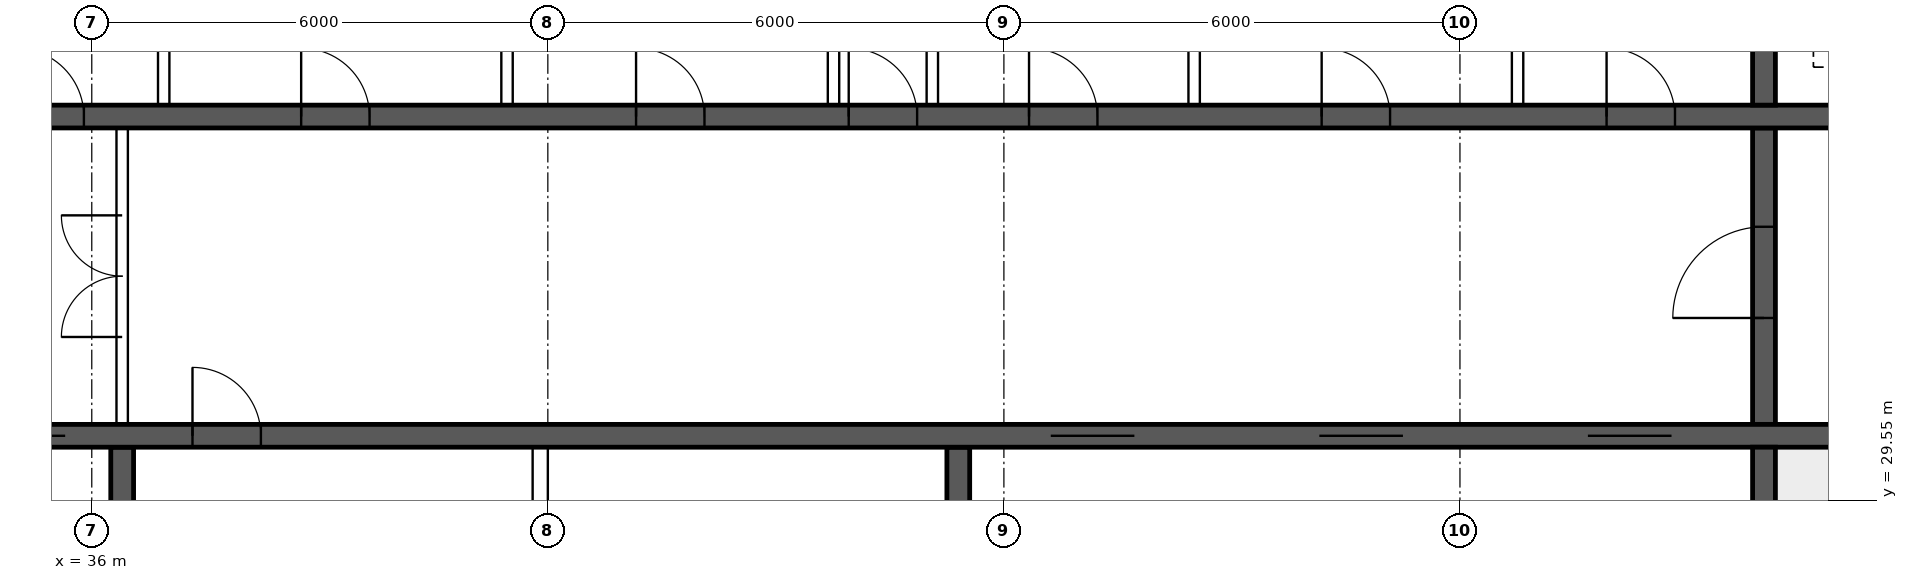
"""IFC4 building model, lengths in metres.
Left out: names, types, materials, properties, quantities, classifications, styles, units other than length and angle.
Written with IfcOpenShell. Run it as: python <this file> out.ifc"""

import sys

from ifc_helpers import new_model, si_unit, direction, frame, frame_2d, origin, place, context, subcontext, project, spatial, rectangle, extrude, element, fill, save


model = new_model("IFC4")
c1 = context("Model", 3, precision=1e-05, world=origin(), true_north=direction((0.0, 1.0)))
c2 = subcontext(c1, "Body", "Model", "MODEL_VIEW")
j1 = project(units=[si_unit("LENGTHUNIT", "METRE"), si_unit("PLANEANGLEUNIT", "RADIAN")], contexts=[c1])
p1 = place(None, origin())
s1 = spatial("IfcSite", under=j1, at=p1, CompositionType="ELEMENT")
p2 = place(p1, origin())
s2 = spatial("IfcBuilding", under=s1, at=p2, CompositionType="ELEMENT")
p3 = place(p2, frame((0.0, 0.0, 212.8)))
s3 = spatial("IfcBuildingStorey", under=s2, at=p3, CompositionType="ELEMENT", Elevation=212.8)
p4 = place(p3, frame((18.35, 30.4, 0.0), z_axis=(0.0, 0.0, 1.0), x_axis=(1.0, 0.0, 0.0)))
e1 = element("IfcWall", 1, at=p4, inside=s3, PredefinedType="SHEAR", context=c2, shape_type="SweptSolid", body=[
    extrude(rectangle(XDim=47.3, YDim=0.3, at=frame_2d((23.65, 0.0))), origin(), (0.0, 0.0, 1.0), 3.75),
])
p5 = place(p4, frame((0.4, 0.0, 0.0)))
e2 = element("IfcOpeningElement", 2, at=p5, cuts=e1, PredefinedType="OPENING", context=c2, shape_type="SweptSolid", body=[
    extrude(rectangle(XDim=1.0, YDim=2.1, at=frame_2d((0.5, 1.05))), frame((0.0, 0.16, 0.0), z_axis=(0.0, -1.0, 0.0), x_axis=(1.0, 0.0, 0.0)), (0.0, 0.0, 1.0), 0.32),
])
p6 = place(p4, frame((45.9, 0.0, 0.0)))
e3 = element("IfcOpeningElement", 3, at=p6, cuts=e1, PredefinedType="OPENING", context=c2, shape_type="SweptSolid", body=[
    extrude(rectangle(XDim=1.0, YDim=2.1, at=frame_2d((0.5, 1.05))), frame((0.0, 0.16, 0.0), z_axis=(0.0, -1.0, 0.0), x_axis=(1.0, 0.0, 0.0)), (0.0, 0.0, 1.0), 0.32),
])
p7 = place(p4, frame((8.4, 0.0, 0.0)))
e4 = element("IfcOpeningElement", 4, at=p7, cuts=e1, PredefinedType="OPENING", context=c2, shape_type="SweptSolid", body=[
    extrude(rectangle(XDim=1.1, YDim=2.1, at=frame_2d((0.55, 1.05))), frame((0.0, 0.16, 0.0), z_axis=(0.0, -1.0, 0.0), x_axis=(1.0, 0.0, 0.0)), (0.0, 0.0, 1.0), 0.32),
])
p8 = place(p4, frame((11.0, 0.0, 0.0)))
e5 = element("IfcOpeningElement", 5, at=p8, cuts=e1, PredefinedType="OPENING", context=c2, shape_type="SweptSolid", body=[
    extrude(rectangle(XDim=1.1, YDim=2.1, at=frame_2d((0.55, 1.05))), frame((0.0, 0.16, 0.0), z_axis=(0.0, -1.0, 0.0), x_axis=(1.0, 0.0, 0.0)), (0.0, 0.0, 1.0), 0.32),
])
p9 = place(p4, frame((13.6, 0.0, 0.0)))
e6 = element("IfcOpeningElement", 6, at=p9, cuts=e1, PredefinedType="OPENING", context=c2, shape_type="SweptSolid", body=[
    extrude(rectangle(XDim=1.1, YDim=2.1, at=frame_2d((0.55, 1.05))), frame((0.0, 0.16, 0.0), z_axis=(0.0, -1.0, 0.0), x_axis=(1.0, 0.0, 0.0)), (0.0, 0.0, 1.0), 0.32),
])
p10 = place(p4, frame((16.2, 0.0, 0.0)))
e7 = element("IfcOpeningElement", 7, at=p10, cuts=e1, PredefinedType="OPENING", context=c2, shape_type="SweptSolid", body=[
    extrude(rectangle(XDim=1.1, YDim=2.1, at=frame_2d((0.55, 1.05))), frame((0.0, 0.16, 0.0), z_axis=(0.0, -1.0, 0.0), x_axis=(1.0, 0.0, 0.0)), (0.0, 0.0, 1.0), 0.32),
])
p11 = place(p4, frame((18.975, 0.0, 0.0)))
e8 = element("IfcOpeningElement", 8, at=p11, cuts=e1, PredefinedType="OPENING", context=c2, shape_type="SweptSolid", body=[
    extrude(rectangle(XDim=0.9, YDim=2.1, at=frame_2d((0.45, 1.05))), frame((0.0, 0.16, 0.0), z_axis=(0.0, -1.0, 0.0), x_axis=(1.0, 0.0, 0.0)), (0.0, 0.0, 1.0), 0.32),
])
p12 = place(p4, frame((30.267, 0.0, 0.0)))
e9 = element("IfcOpeningElement", 9, at=p12, cuts=e1, PredefinedType="OPENING", context=c2, shape_type="SweptSolid", body=[
    extrude(rectangle(XDim=1.1, YDim=2.1, at=frame_2d((0.55, 1.05))), frame((0.0, 0.16, 0.0), z_axis=(0.0, -1.0, 0.0), x_axis=(1.0, 0.0, 0.0)), (0.0, 0.0, 1.0), 0.32),
])
p13 = place(p4, frame((33.8, 0.0, 0.0)))
e10 = element("IfcOpeningElement", 10, at=p13, cuts=e1, PredefinedType="OPENING", context=c2, shape_type="SweptSolid", body=[
    extrude(rectangle(XDim=1.1, YDim=2.1, at=frame_2d((0.55, 1.05))), frame((0.0, 0.16, 0.0), z_axis=(0.0, -1.0, 0.0), x_axis=(1.0, 0.0, 0.0)), (0.0, 0.0, 1.0), 0.32),
])
p14 = place(p4, frame((37.333, 0.0, 0.0)))
e11 = element("IfcOpeningElement", 11, at=p14, cuts=e1, PredefinedType="OPENING", context=c2, shape_type="SweptSolid", body=[
    extrude(rectangle(XDim=1.1, YDim=2.1, at=frame_2d((0.55, 1.05))), frame((0.0, 0.16, 0.0), z_axis=(0.0, -1.0, 0.0), x_axis=(1.0, 0.0, 0.0)), (0.0, 0.0, 1.0), 0.32),
])
p15 = place(p3, frame((18.35, 34.6, 0.0), z_axis=(0.0, 0.0, 1.0), x_axis=(1.0, 0.0, 0.0)))
e12 = element("IfcWall", 12, at=p15, inside=s3, PredefinedType="SHEAR", context=c2, shape_type="SweptSolid", body=[
    extrude(rectangle(XDim=47.3, YDim=0.3, at=frame_2d((23.65, 0.0))), origin(), (0.0, 0.0, 1.0), 3.75),
])
p16 = place(p15, frame((0.9, 0.0, 0.0)))
e13 = element("IfcOpeningElement", 13, at=p16, cuts=e12, PredefinedType="OPENING", context=c2, shape_type="SweptSolid", body=[
    extrude(rectangle(XDim=1.1, YDim=2.1, at=frame_2d((0.55, 1.05))), frame((0.0, 0.16, 0.0), z_axis=(0.0, -1.0, 0.0), x_axis=(1.0, 0.0, 0.0)), (0.0, 0.0, 1.0), 0.32),
])
p17 = place(p15, frame((45.3, 0.0, 0.0)))
e14 = element("IfcOpeningElement", 14, at=p17, cuts=e12, PredefinedType="OPENING", context=c2, shape_type="SweptSolid", body=[
    extrude(rectangle(XDim=1.1, YDim=2.1, at=frame_2d((0.55, 1.05))), frame((0.0, 0.16, 0.0), z_axis=(0.0, -1.0, 0.0), x_axis=(1.0, 0.0, 0.0)), (0.0, 0.0, 1.0), 0.32),
])
p18 = place(p15, frame((4.25, 0.0, 0.0)))
e15 = element("IfcOpeningElement", 15, at=p18, cuts=e12, PredefinedType="OPENING", context=c2, shape_type="SweptSolid", body=[
    extrude(rectangle(XDim=0.9, YDim=2.1, at=frame_2d((0.45, 1.05))), frame((0.0, 0.16, 0.0), z_axis=(0.0, -1.0, 0.0), x_axis=(1.0, 0.0, 0.0)), (0.0, 0.0, 1.0), 0.32),
])
p19 = place(p15, frame((42.15, 0.0, 0.0)))
e16 = element("IfcOpeningElement", 16, at=p19, cuts=e12, PredefinedType="OPENING", context=c2, shape_type="SweptSolid", body=[
    extrude(rectangle(XDim=0.9, YDim=2.1, at=frame_2d((0.45, 1.05))), frame((0.0, 0.16, 0.0), z_axis=(0.0, -1.0, 0.0), x_axis=(1.0, 0.0, 0.0)), (0.0, 0.0, 1.0), 0.32),
])
p20 = place(p15, frame((9.025, 0.0, 0.0)))
e17 = element("IfcOpeningElement", 17, at=p20, cuts=e12, PredefinedType="OPENING", context=c2, shape_type="SweptSolid", body=[
    extrude(rectangle(XDim=0.9, YDim=2.1, at=frame_2d((0.45, 1.05))), frame((0.0, 0.16, 0.0), z_axis=(0.0, -1.0, 0.0), x_axis=(1.0, 0.0, 0.0)), (0.0, 0.0, 1.0), 0.32),
])
p21 = place(p15, frame((12.999, 0.0, 0.0)))
e18 = element("IfcOpeningElement", 18, at=p21, cuts=e12, PredefinedType="OPENING", context=c2, shape_type="SweptSolid", body=[
    extrude(rectangle(XDim=0.9, YDim=2.1, at=frame_2d((0.45, 1.05))), frame((0.0, 0.16, 0.0), z_axis=(0.0, -1.0, 0.0), x_axis=(1.0, 0.0, 0.0)), (0.0, 0.0, 1.0), 0.32),
])
p22 = place(p15, frame((16.646, 0.0, 0.0)))
e19 = element("IfcOpeningElement", 19, at=p22, cuts=e12, PredefinedType="OPENING", context=c2, shape_type="SweptSolid", body=[
    extrude(rectangle(XDim=0.9, YDim=2.1, at=frame_2d((0.45, 1.05))), frame((0.0, 0.16, 0.0), z_axis=(0.0, -1.0, 0.0), x_axis=(1.0, 0.0, 0.0)), (0.0, 0.0, 1.0), 0.32),
])
p23 = place(p15, frame((20.405, 0.0, 0.0)))
e20 = element("IfcOpeningElement", 20, at=p23, cuts=e12, PredefinedType="OPENING", context=c2, shape_type="SweptSolid", body=[
    extrude(rectangle(XDim=0.9, YDim=2.1, at=frame_2d((0.45, 1.05))), frame((0.0, 0.16, 0.0), z_axis=(0.0, -1.0, 0.0), x_axis=(1.0, 0.0, 0.0)), (0.0, 0.0, 1.0), 0.32),
])
p24 = place(p15, frame((24.811, 0.0, 0.0)))
e21 = element("IfcOpeningElement", 21, at=p24, cuts=e12, PredefinedType="OPENING", context=c2, shape_type="SweptSolid", body=[
    extrude(rectangle(XDim=0.9, YDim=2.1, at=frame_2d((0.45, 1.05))), frame((0.0, 0.16, 0.0), z_axis=(0.0, -1.0, 0.0), x_axis=(1.0, 0.0, 0.0)), (0.0, 0.0, 1.0), 0.32),
])
p25 = place(p15, frame((27.608, 0.0, 0.0)))
e22 = element("IfcOpeningElement", 22, at=p25, cuts=e12, PredefinedType="OPENING", context=c2, shape_type="SweptSolid", body=[
    extrude(rectangle(XDim=0.9, YDim=2.1, at=frame_2d((0.45, 1.05))), frame((0.0, 0.16, 0.0), z_axis=(0.0, -1.0, 0.0), x_axis=(1.0, 0.0, 0.0)), (0.0, 0.0, 1.0), 0.32),
])
p26 = place(p15, frame((29.981, 0.0, 0.0)))
e23 = element("IfcOpeningElement", 23, at=p26, cuts=e12, PredefinedType="OPENING", context=c2, shape_type="SweptSolid", body=[
    extrude(rectangle(XDim=0.9, YDim=2.1, at=frame_2d((0.45, 1.05))), frame((0.0, 0.16, 0.0), z_axis=(0.0, -1.0, 0.0), x_axis=(1.0, 0.0, 0.0)), (0.0, 0.0, 1.0), 0.32),
])
p27 = place(p15, frame((33.831, 0.0, 0.0)))
e24 = element("IfcOpeningElement", 24, at=p27, cuts=e12, PredefinedType="OPENING", context=c2, shape_type="SweptSolid", body=[
    extrude(rectangle(XDim=0.9, YDim=2.1, at=frame_2d((0.45, 1.05))), frame((0.0, 0.16, 0.0), z_axis=(0.0, -1.0, 0.0), x_axis=(1.0, 0.0, 0.0)), (0.0, 0.0, 1.0), 0.32),
])
p28 = place(p15, frame((37.579, 0.0, 0.0)))
e25 = element("IfcOpeningElement", 25, at=p28, cuts=e12, PredefinedType="OPENING", context=c2, shape_type="SweptSolid", body=[
    extrude(rectangle(XDim=0.9, YDim=2.1, at=frame_2d((0.45, 1.05))), frame((0.0, 0.16, 0.0), z_axis=(0.0, -1.0, 0.0), x_axis=(1.0, 0.0, 0.0)), (0.0, 0.0, 1.0), 0.32),
])
p29 = place(p3, frame((58.0, 26.15, 0.0), z_axis=(0.0, 0.0, 1.0), x_axis=(0.0, 1.0, 0.0)))
e26 = element("IfcWall", 26, at=p29, inside=s3, PredefinedType="SHEAR", context=c2, shape_type="SweptSolid", body=[
    extrude(rectangle(XDim=4.1, YDim=0.3, at=frame_2d((2.05, 0.0))), origin(), (0.0, 0.0, 1.0), 3.75),
])
p30 = place(p3, frame((58.0, 30.55, 0.0), z_axis=(0.0, 0.0, 1.0), x_axis=(0.0, 1.0, 0.0)))
e27 = element("IfcWall", 27, at=p30, inside=s3, PredefinedType="SHEAR", context=c2, shape_type="SweptSolid", body=[
    extrude(rectangle(XDim=3.9, YDim=0.3, at=frame_2d((1.95, 0.0))), origin(), (0.0, 0.0, 1.0), 3.75),
])
p31 = place(p30, frame((1.4, 0.0, 0.0)))
e28 = element("IfcOpeningElement", 28, at=p31, cuts=e27, PredefinedType="OPENING", context=c2, shape_type="SweptSolid", body=[
    extrude(rectangle(XDim=1.2, YDim=2.1, at=frame_2d((0.6, 1.05))), frame((0.0, 0.16, 0.0), z_axis=(0.0, -1.0, 0.0), x_axis=(1.0, 0.0, 0.0)), (0.0, 0.0, 1.0), 0.32),
])
p32 = place(p3, frame((58.0, 34.75, 0.0), z_axis=(0.0, 0.0, 1.0), x_axis=(0.0, 1.0, 0.0)))
e29 = element("IfcWall", 29, at=p32, inside=s3, PredefinedType="SHEAR", context=c2, shape_type="SweptSolid", body=[
    extrude(rectangle(XDim=3.1, YDim=0.3, at=frame_2d((1.55, 0.0))), origin(), (0.0, 0.0, 1.0), 3.75),
])
for number, where, z_axis, x_axis in (
    (30, (36.4, 26.15, 0.0), (0.0, 0.0, 1.0), (0.0, 1.0, 0.0)),
    (31, (47.4, 26.15, 0.0), (0.0, 0.0, 1.0), (0.0, 1.0, 0.0)),
):
    element("IfcWall", number, at=place(p3, frame(where, z_axis=z_axis, x_axis=x_axis)), inside=s3, PredefinedType="SHEAR", context=c2, shape_type="SweptSolid", body=[
        extrude(rectangle(XDim=4.1, YDim=0.3, at=frame_2d((2.05, 0.0))), origin(), (0.0, 0.0, 1.0), 3.75),
    ])
p33 = place(p3, frame((36.4, 30.55, 0.0), z_axis=(0.0, 0.0, 1.0), x_axis=(0.0, 1.0, 0.0)))
e32 = element("IfcWall", 32, at=p33, inside=s3, PredefinedType="SOLIDWALL", context=c2, shape_type="SweptSolid", body=[
    extrude(rectangle(XDim=3.9, YDim=0.15, at=frame_2d((1.95, 0.0))), origin(), (0.0, 0.0, 1.0), 3.3),
])
p34 = place(p33, frame((1.15, 0.0, 0.0)))
e33 = element("IfcOpeningElement", 33, at=p34, cuts=e32, PredefinedType="OPENING", context=c2, shape_type="SweptSolid", body=[
    extrude(rectangle(XDim=1.6, YDim=2.1, at=frame_2d((0.8, 1.05))), frame((0.0, 0.085, 0.0), z_axis=(0.0, -1.0, 0.0), x_axis=(1.0, 0.0, 0.0)), (0.0, 0.0, 1.0), 0.17),
])
for number, where, z_axis, x_axis in (
    (34, (36.946, 34.75, 0.0), (0.0, 0.0, 1.0), (0.0, 1.0, 0.0)),
    (35, (41.463, 34.75, 0.0), (0.0, 0.0, 1.0), (0.0, 1.0, 0.0)),
    (36, (45.758, 34.75, 0.0), (0.0, 0.0, 1.0), (0.0, 1.0, 0.0)),
    (37, (47.058, 34.75, 0.0), (0.0, 0.0, 1.0), (0.0, 1.0, 0.0)),
    (38, (50.503, 34.75, 0.0), (0.0, 0.0, 1.0), (0.0, 1.0, 0.0)),
    (39, (54.758, 34.75, 0.0), (0.0, 0.0, 1.0), (0.0, 1.0, 0.0)),
):
    element("IfcWall", number, at=place(p3, frame(where, z_axis=z_axis, x_axis=x_axis)), inside=s3, PredefinedType="SOLIDWALL", context=c2, shape_type="SweptSolid", body=[
        extrude(rectangle(XDim=3.1, YDim=0.15, at=frame_2d((1.55, 0.0))), origin(), (0.0, 0.0, 1.0), 3.3),
    ])
p35 = place(p3, frame((41.9, 26.15, 0.0), z_axis=(0.0, 0.0, 1.0), x_axis=(0.0, 1.0, 0.0)))
e40 = element("IfcWall", 40, at=p35, inside=s3, PredefinedType="SOLIDWALL", context=c2, shape_type="SweptSolid", body=[
    extrude(rectangle(XDim=4.1, YDim=0.2, at=frame_2d((2.05, 0.0))), origin(), (0.0, 0.0, 1.0), 3.3),
])
p36 = place(p34, origin())
e41 = element("IfcDoor", 41, at=p36, inside=s3, OperationType="DOUBLE_DOOR_SINGLE_SWING", PredefinedType="DOOR", context=c2, shape_type="SweptSolid", body=[
    extrude(rectangle(XDim=1.6, YDim=2.1, at=frame_2d((0.8, 1.05))), frame((0.0, 0.025, 0.0), z_axis=(0.0, -1.0, 0.0), x_axis=(1.0, 0.0, 0.0)), (0.0, 0.0, 1.0), 0.05),
])
fill(e33, e41)
p37 = place(p31, origin())
e42 = element("IfcDoor", 42, at=p37, inside=s3, OperationType="SINGLE_SWING_LEFT", PredefinedType="DOOR", context=c2, shape_type="SweptSolid", body=[
    extrude(rectangle(XDim=1.2, YDim=2.1, at=frame_2d((0.6, 1.05))), frame((0.0, 0.025, 0.0), z_axis=(0.0, -1.0, 0.0), x_axis=(1.0, 0.0, 0.0)), (0.0, 0.0, 1.0), 0.05),
])
fill(e28, e42)
p38 = place(p22, origin())
e43 = element("IfcDoor", 43, at=p38, inside=s3, OperationType="SINGLE_SWING_LEFT", PredefinedType="DOOR", context=c2, shape_type="SweptSolid", body=[
    extrude(rectangle(XDim=0.9, YDim=2.1, at=frame_2d((0.45, 1.05))), frame((0.0, 0.025, 0.0), z_axis=(0.0, -1.0, 0.0), x_axis=(1.0, 0.0, 0.0)), (0.0, 0.0, 1.0), 0.05),
])
fill(e19, e43)
p39 = place(p23, origin())
e44 = element("IfcDoor", 44, at=p39, inside=s3, OperationType="SINGLE_SWING_LEFT", PredefinedType="DOOR", context=c2, shape_type="SweptSolid", body=[
    extrude(rectangle(XDim=0.9, YDim=2.1, at=frame_2d((0.45, 1.05))), frame((0.0, 0.025, 0.0), z_axis=(0.0, -1.0, 0.0), x_axis=(1.0, 0.0, 0.0)), (0.0, 0.0, 1.0), 0.05),
])
fill(e20, e44)
p40 = place(p24, origin())
e45 = element("IfcDoor", 45, at=p40, inside=s3, OperationType="SINGLE_SWING_LEFT", PredefinedType="DOOR", context=c2, shape_type="SweptSolid", body=[
    extrude(rectangle(XDim=0.9, YDim=2.1, at=frame_2d((0.45, 1.05))), frame((0.0, 0.025, 0.0), z_axis=(0.0, -1.0, 0.0), x_axis=(1.0, 0.0, 0.0)), (0.0, 0.0, 1.0), 0.05),
])
fill(e21, e45)
p41 = place(p25, origin())
e46 = element("IfcDoor", 46, at=p41, inside=s3, OperationType="SINGLE_SWING_LEFT", PredefinedType="DOOR", context=c2, shape_type="SweptSolid", body=[
    extrude(rectangle(XDim=0.9, YDim=2.1, at=frame_2d((0.45, 1.05))), frame((0.0, 0.025, 0.0), z_axis=(0.0, -1.0, 0.0), x_axis=(1.0, 0.0, 0.0)), (0.0, 0.0, 1.0), 0.05),
])
fill(e22, e46)
p42 = place(p26, origin())
e47 = element("IfcDoor", 47, at=p42, inside=s3, OperationType="SINGLE_SWING_LEFT", PredefinedType="DOOR", context=c2, shape_type="SweptSolid", body=[
    extrude(rectangle(XDim=0.9, YDim=2.1, at=frame_2d((0.45, 1.05))), frame((0.0, 0.025, 0.0), z_axis=(0.0, -1.0, 0.0), x_axis=(1.0, 0.0, 0.0)), (0.0, 0.0, 1.0), 0.05),
])
fill(e23, e47)
p43 = place(p27, origin())
e48 = element("IfcDoor", 48, at=p43, inside=s3, OperationType="SINGLE_SWING_LEFT", PredefinedType="DOOR", context=c2, shape_type="SweptSolid", body=[
    extrude(rectangle(XDim=0.9, YDim=2.1, at=frame_2d((0.45, 1.05))), frame((0.0, 0.025, 0.0), z_axis=(0.0, -1.0, 0.0), x_axis=(1.0, 0.0, 0.0)), (0.0, 0.0, 1.0), 0.05),
])
fill(e24, e48)
p44 = place(p28, origin())
e49 = element("IfcDoor", 49, at=p44, inside=s3, OperationType="SINGLE_SWING_LEFT", PredefinedType="DOOR", context=c2, shape_type="SweptSolid", body=[
    extrude(rectangle(XDim=0.9, YDim=2.1, at=frame_2d((0.45, 1.05))), frame((0.0, 0.025, 0.0), z_axis=(0.0, -1.0, 0.0), x_axis=(1.0, 0.0, 0.0)), (0.0, 0.0, 1.0), 0.05),
])
fill(e25, e49)
p45 = place(p10, origin())
e50 = element("IfcDoor", 50, at=p45, inside=s3, OperationType="DOUBLE_DOOR_SLIDING", PredefinedType="DOOR", context=c2, shape_type="SweptSolid", body=[
    extrude(rectangle(XDim=1.1, YDim=2.1, at=frame_2d((0.55, 1.05))), frame((0.0, 0.025, 0.0), z_axis=(0.0, -1.0, 0.0), x_axis=(1.0, 0.0, 0.0)), (0.0, 0.0, 1.0), 0.05),
])
fill(e7, e50)
p46 = place(p11, origin())
e51 = element("IfcDoor", 51, at=p46, inside=s3, OperationType="SINGLE_SWING_LEFT", PredefinedType="DOOR", context=c2, shape_type="SweptSolid", body=[
    extrude(rectangle(XDim=0.9, YDim=2.1, at=frame_2d((0.45, 1.05))), frame((0.0, 0.025, 0.0), z_axis=(0.0, -1.0, 0.0), x_axis=(1.0, 0.0, 0.0)), (0.0, 0.0, 1.0), 0.05),
])
fill(e8, e51)
p47 = place(p12, origin())
e52 = element("IfcDoor", 52, at=p47, inside=s3, OperationType="DOUBLE_DOOR_SLIDING", PredefinedType="DOOR", context=c2, shape_type="SweptSolid", body=[
    extrude(rectangle(XDim=1.1, YDim=2.1, at=frame_2d((0.55, 1.05))), frame((0.0, 0.025, 0.0), z_axis=(0.0, -1.0, 0.0), x_axis=(1.0, 0.0, 0.0)), (0.0, 0.0, 1.0), 0.05),
])
fill(e9, e52)
p48 = place(p13, origin())
e53 = element("IfcDoor", 53, at=p48, inside=s3, OperationType="DOUBLE_DOOR_SLIDING", PredefinedType="DOOR", context=c2, shape_type="SweptSolid", body=[
    extrude(rectangle(XDim=1.1, YDim=2.1, at=frame_2d((0.55, 1.05))), frame((0.0, 0.025, 0.0), z_axis=(0.0, -1.0, 0.0), x_axis=(1.0, 0.0, 0.0)), (0.0, 0.0, 1.0), 0.05),
])
fill(e10, e53)
p49 = place(p14, origin())
e54 = element("IfcDoor", 54, at=p49, inside=s3, OperationType="DOUBLE_DOOR_SLIDING", PredefinedType="DOOR", context=c2, shape_type="SweptSolid", body=[
    extrude(rectangle(XDim=1.1, YDim=2.1, at=frame_2d((0.55, 1.05))), frame((0.0, 0.025, 0.0), z_axis=(0.0, -1.0, 0.0), x_axis=(1.0, 0.0, 0.0)), (0.0, 0.0, 1.0), 0.05),
])
fill(e11, e54)
save(model, sys.argv[1])
